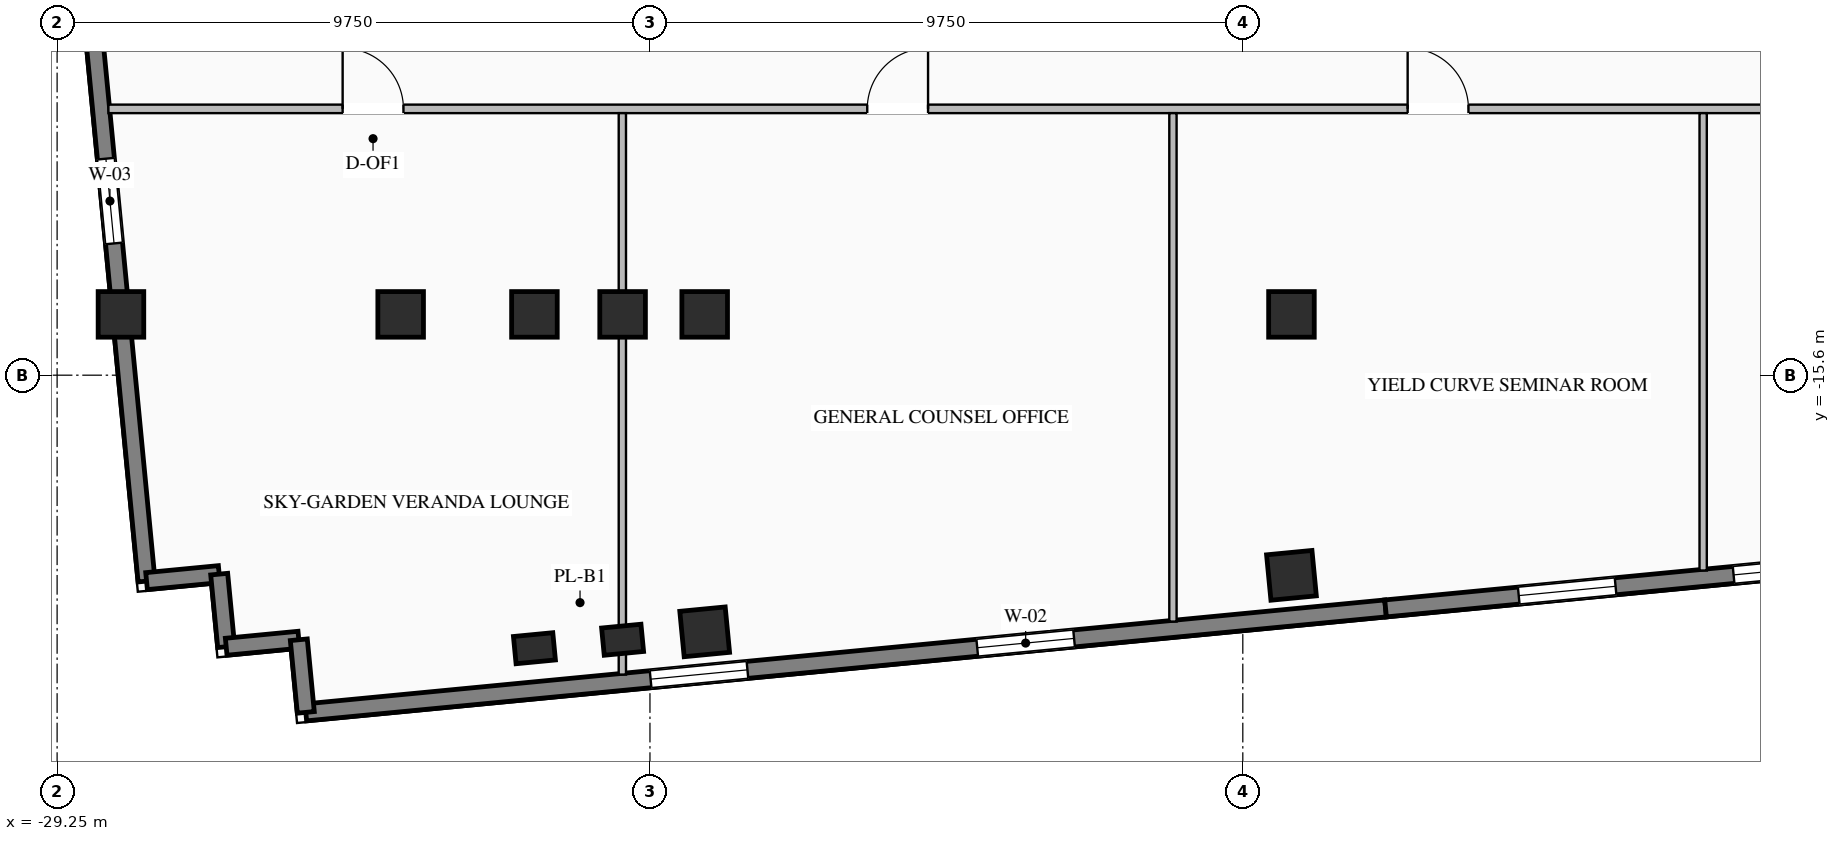
"""IFC4 building model, lengths in metres.
Left out: names, types, materials, properties, quantities, classifications, styles, units other than length and angle.
Written with IfcOpenShell. Run it as: python <this file> out.ifc"""

import sys

from ifc_helpers import new_model, si_unit, direction, frame, frame_2d, origin, origin_2d, place, context, subcontext, project, spatial, rectangle, i_section, extrude, element, fill, save


model = new_model("IFC4")
c1 = context("Model", 3, precision=1e-05, world=origin(), true_north=direction((0.0, 1.0)))
c2 = subcontext(c1, "Body", "Model", "MODEL_VIEW")
j1 = project(units=[si_unit("LENGTHUNIT", "METRE"), si_unit("PLANEANGLEUNIT", "RADIAN")], contexts=[c1])
p1 = place(None, origin())
s1 = spatial("IfcSite", under=j1, at=p1, CompositionType="ELEMENT")
p2 = place(p1, origin())
s2 = spatial("IfcBuilding", under=s1, at=p2, CompositionType="ELEMENT")
p3 = place(p2, frame((0.0, 0.0, 84.55)))
s3 = spatial("IfcBuildingStorey", under=s2, at=p3, CompositionType="ELEMENT", Elevation=84.55)
for number, where, z_axis, x_axis in (
    (1, (-21.4, -14.6, 0.0), (0.0, 0.0, 1.0), (1.0, 0.0, 0.0)),
    (2, (-19.95, -14.6, 0.0), (0.0, 0.0, 1.0), (1.0, 0.0, 0.0)),
    (3, (-18.6, -14.6, 0.0), (0.0, 0.0, 1.0), (1.0, 0.0, 0.0)),
    (4, (-8.95, -14.6, 0.0), (0.0, 0.0, 1.0), (1.0, 0.0, 0.0)),
    (5, (-23.6, -14.6, 0.0), (0.0, 0.0, 1.0), (1.0, 0.0, 0.0)),
    (6, (-28.2, -14.6, 0.0), (0.0, 0.0, 1.0), (1.0, 0.0, 0.0)),
    (7, (-18.6, -19.821, 0.0), (0.0, 0.0, 1.0), (0.995, 0.096, 0.0)),
    (8, (-8.95, -18.892, 0.0), (0.0, 0.0, 1.0), (0.995, 0.096, 0.0)),
):
    element("IfcColumn", number, at=place(p3, frame(where, z_axis=z_axis, x_axis=x_axis)), inside=s3, PredefinedType="COLUMN", context=c2, shape_type="SweptSolid", body=[
        extrude(i_section(OverallWidth=0.75, OverallDepth=0.75, WebThickness=0.03, FlangeThickness=0.044, at=origin_2d()), origin(), (0.0, 0.0, 1.0), 3.45),
    ])
for number, where, z_axis, x_axis in (
    (9, (-21.4, -20.091, 0.0), (0.0, 0.0, 1.0), (0.995, 0.096, 0.0)),
    (10, (-19.95, -19.951, 0.0), (0.0, 0.0, 1.0), (0.995, 0.096, 0.0)),
):
    element("IfcColumn", number, at=place(p3, frame(where, z_axis=z_axis, x_axis=x_axis)), inside=s3, PredefinedType="PILASTER", context=c2, shape_type="SweptSolid", body=[
        extrude(rectangle(XDim=0.65, YDim=0.45, at=origin_2d()), origin(), (0.0, 0.0, 1.0), 3.45),
    ])
p4 = place(p3, frame((-7.402, -19.436, 0.0), z_axis=(0.0, 0.0, 1.0), x_axis=(-0.995395780835, -0.095850088663, 0.0)))
e11 = element("IfcWall", 11, at=p4, inside=s3, PredefinedType="STANDARD", context=c2, shape_type="SweptSolid", body=[
    extrude(rectangle(XDim=17.84, YDim=0.28, at=frame_2d((8.92, 0.0))), origin(), (0.0, 0.0, 1.0), 3.25),
])
p5 = place(p4, frame((5.147, 0.0, 0.76)))
e12 = element("IfcOpeningElement", 12, at=p5, cuts=e11, PredefinedType="OPENING", context=c2, shape_type="SweptSolid", body=[
    extrude(rectangle(XDim=1.6, YDim=1.95, at=frame_2d((0.8, 0.975))), frame((0.0, 0.15, 0.0), z_axis=(0.0, -1.0, 0.0), x_axis=(1.0, 0.0, 0.0)), (0.0, 0.0, 1.0), 0.3),
])
p6 = place(p4, frame((10.543, 0.0, 0.76)))
e13 = element("IfcOpeningElement", 13, at=p6, cuts=e11, PredefinedType="OPENING", context=c2, shape_type="SweptSolid", body=[
    extrude(rectangle(XDim=1.6, YDim=1.95, at=frame_2d((0.8, 0.975))), frame((0.0, 0.15, 0.0), z_axis=(0.0, -1.0, 0.0), x_axis=(1.0, 0.0, 0.0)), (0.0, 0.0, 1.0), 0.3),
])
p7 = place(p3, frame((1.556, -18.573, 0.0), z_axis=(0.0, 0.0, 1.0), x_axis=(-0.995396794462, -0.09583956164, 0.0)))
e14 = element("IfcWall", 14, at=p7, inside=s3, PredefinedType="STANDARD", context=c2, shape_type="SweptSolid", body=[
    extrude(rectangle(XDim=9.0, YDim=0.28, at=frame_2d((4.5, 0.0))), origin(), (0.0, 0.0, 1.0), 3.25),
])
p8 = place(p7, frame((1.65, 0.0, 0.76)))
e15 = element("IfcOpeningElement", 15, at=p8, cuts=e14, PredefinedType="OPENING", context=c2, shape_type="SweptSolid", body=[
    extrude(rectangle(XDim=1.6, YDim=1.95, at=frame_2d((0.8, 0.975))), frame((0.0, 0.15, 0.0), z_axis=(0.0, -1.0, 0.0), x_axis=(1.0, 0.0, 0.0)), (0.0, 0.0, 1.0), 0.3),
])
p9 = place(p7, frame((5.2, 0.0, 0.76)))
e16 = element("IfcOpeningElement", 16, at=p9, cuts=e14, PredefinedType="OPENING", context=c2, shape_type="SweptSolid", body=[
    extrude(rectangle(XDim=1.6, YDim=1.95, at=frame_2d((0.8, 0.975))), frame((0.0, 0.15, 0.0), z_axis=(0.0, -1.0, 0.0), x_axis=(1.0, 0.0, 0.0)), (0.0, 0.0, 1.0), 0.3),
])
p10 = place(p3, frame((-27.779, -18.987, 0.0), z_axis=(0.0, 0.0, 1.0), x_axis=(-0.095842534142, 0.995396508256, 0.0)))
e17 = element("IfcWall", 17, at=p10, inside=s3, PredefinedType="STANDARD", context=c2, shape_type="SweptSolid", body=[
    extrude(rectangle(XDim=18.84, YDim=0.28, at=frame_2d((9.42, 0.0))), origin(), (0.0, 0.0, 1.0), 3.25),
])
p11 = place(p10, frame((5.58, 0.0, 0.76)))
e18 = element("IfcOpeningElement", 18, at=p11, cuts=e17, PredefinedType="OPENING", context=c2, shape_type="SweptSolid", body=[
    extrude(rectangle(XDim=1.4, YDim=1.95, at=frame_2d((0.7, 0.975))), frame((0.0, 0.15, 0.0), z_axis=(0.0, -1.0, 0.0), x_axis=(1.0, 0.0, 0.0)), (0.0, 0.0, 1.0), 0.3),
])
p12 = place(p10, frame((11.86, 0.0, 0.76)))
e19 = element("IfcOpeningElement", 19, at=p12, cuts=e17, PredefinedType="OPENING", context=c2, shape_type="SweptSolid", body=[
    extrude(rectangle(XDim=1.4, YDim=1.95, at=frame_2d((0.7, 0.975))), frame((0.0, 0.15, 0.0), z_axis=(0.0, -1.0, 0.0), x_axis=(1.0, 0.0, 0.0)), (0.0, 0.0, 1.0), 0.3),
])
for number, where, z_axis, x_axis in (
    (20, (-27.779, -18.987, 0.0), (0.0, 0.0, 1.0), (0.995, 0.096, 0.0)),
    (21, (-26.584, -18.872, 0.0), (0.0, 0.0, 1.0), (0.096, -0.995, 0.0)),
    (22, (-26.469, -20.067, 0.0), (0.0, 0.0, 1.0), (0.995, 0.096, 0.0)),
):
    element("IfcWall", number, at=place(p3, frame(where, z_axis=z_axis, x_axis=x_axis)), inside=s3, PredefinedType="STANDARD", context=c2, shape_type="SweptSolid", body=[
        extrude(rectangle(XDim=1.2, YDim=0.28, at=frame_2d((0.6, 0.0))), origin(), (0.0, 0.0, 1.0), 3.25),
    ])
p13 = place(p3, frame((-25.275, -19.952, 0.0), z_axis=(0.0, 0.0, 1.0), x_axis=(0.095836473879, -0.995397091755, 0.0)))
e23 = element("IfcWall", 23, at=p13, inside=s3, PredefinedType="STANDARD", context=c2, shape_type="SweptSolid", body=[
    extrude(rectangle(XDim=1.2, YDim=0.28, at=frame_2d((0.6, 0.0))), origin(), (0.0, 0.0, 1.0), 3.25),
])
p14 = place(p3, frame((-28.406, -11.22, 0.0), z_axis=(0.0, 0.0, 1.0), x_axis=(1.0, 0.0, 0.0)))
e24 = element("IfcWall", 24, at=p14, inside=s3, PredefinedType="STANDARD", context=c2, shape_type="SweptSolid", body=[
    extrude(rectangle(XDim=67.551, YDim=0.14, at=frame_2d((33.775, 0.0))), origin(), (0.0, 0.0, 1.0), 2.745),
])
p15 = place(p14, frame((34.896, 0.0, 0.0)))
e25 = element("IfcOpeningElement", 25, at=p15, cuts=e24, PredefinedType="OPENING", context=c2, shape_type="SweptSolid", body=[
    extrude(rectangle(XDim=0.92, YDim=2.08, at=frame_2d((0.46, 1.04))), frame((0.0, 0.08, 0.0), z_axis=(0.0, -1.0, 0.0), x_axis=(1.0, 0.0, 0.0)), (0.0, 0.0, 1.0), 0.16),
])
p16 = place(p14, frame((38.396, 0.0, 0.0)))
e26 = element("IfcOpeningElement", 26, at=p16, cuts=e24, PredefinedType="OPENING", context=c2, shape_type="SweptSolid", body=[
    extrude(rectangle(XDim=0.92, YDim=2.08, at=frame_2d((0.46, 1.04))), frame((0.0, 0.08, 0.0), z_axis=(0.0, -1.0, 0.0), x_axis=(1.0, 0.0, 0.0)), (0.0, 0.0, 1.0), 0.16),
])
p17 = place(p14, frame((41.246, 0.0, 0.0)))
e27 = element("IfcOpeningElement", 27, at=p17, cuts=e24, PredefinedType="OPENING", context=c2, shape_type="SweptSolid", body=[
    extrude(rectangle(XDim=0.92, YDim=2.08, at=frame_2d((0.46, 1.04))), frame((0.0, 0.08, 0.0), z_axis=(0.0, -1.0, 0.0), x_axis=(1.0, 0.0, 0.0)), (0.0, 0.0, 1.0), 0.16),
])
p18 = place(p14, frame((3.852, 0.0, 0.0)))
e28 = element("IfcOpeningElement", 28, at=p18, cuts=e24, PredefinedType="OPENING", context=c2, shape_type="SweptSolid", body=[
    extrude(rectangle(XDim=1.0, YDim=2.08, at=frame_2d((0.5, 1.04))), frame((0.0, 0.08, 0.0), z_axis=(0.0, -1.0, 0.0), x_axis=(1.0, 0.0, 0.0)), (0.0, 0.0, 1.0), 0.16),
])
p19 = place(p14, frame((12.48, 0.0, 0.0)))
e29 = element("IfcOpeningElement", 29, at=p19, cuts=e24, PredefinedType="OPENING", context=c2, shape_type="SweptSolid", body=[
    extrude(rectangle(XDim=1.0, YDim=2.08, at=frame_2d((0.5, 1.04))), frame((0.0, 0.08, 0.0), z_axis=(0.0, -1.0, 0.0), x_axis=(1.0, 0.0, 0.0)), (0.0, 0.0, 1.0), 0.16),
])
p20 = place(p14, frame((21.367, 0.0, 0.0)))
e30 = element("IfcOpeningElement", 30, at=p20, cuts=e24, PredefinedType="OPENING", context=c2, shape_type="SweptSolid", body=[
    extrude(rectangle(XDim=1.0, YDim=2.08, at=frame_2d((0.5, 1.04))), frame((0.0, 0.08, 0.0), z_axis=(0.0, -1.0, 0.0), x_axis=(1.0, 0.0, 0.0)), (0.0, 0.0, 1.0), 0.16),
])
p21 = place(p14, frame((29.417, 0.0, 0.0)))
e31 = element("IfcOpeningElement", 31, at=p21, cuts=e24, PredefinedType="OPENING", context=c2, shape_type="SweptSolid", body=[
    extrude(rectangle(XDim=1.0, YDim=2.08, at=frame_2d((0.5, 1.04))), frame((0.0, 0.08, 0.0), z_axis=(0.0, -1.0, 0.0), x_axis=(1.0, 0.0, 0.0)), (0.0, 0.0, 1.0), 0.16),
])
p22 = place(p14, frame((45.405, 0.0, 0.0)))
e32 = element("IfcOpeningElement", 32, at=p22, cuts=e24, PredefinedType="OPENING", context=c2, shape_type="SweptSolid", body=[
    extrude(rectangle(XDim=1.0, YDim=2.08, at=frame_2d((0.5, 1.04))), frame((0.0, 0.08, 0.0), z_axis=(0.0, -1.0, 0.0), x_axis=(1.0, 0.0, 0.0)), (0.0, 0.0, 1.0), 0.16),
])
p23 = place(p14, frame((51.852, 0.0, 0.0)))
e33 = element("IfcOpeningElement", 33, at=p23, cuts=e24, PredefinedType="OPENING", context=c2, shape_type="SweptSolid", body=[
    extrude(rectangle(XDim=1.0, YDim=2.08, at=frame_2d((0.5, 1.04))), frame((0.0, 0.08, 0.0), z_axis=(0.0, -1.0, 0.0), x_axis=(1.0, 0.0, 0.0)), (0.0, 0.0, 1.0), 0.16),
])
p24 = place(p14, frame((58.422, 0.0, 0.0)))
e34 = element("IfcOpeningElement", 34, at=p24, cuts=e24, PredefinedType="OPENING", context=c2, shape_type="SweptSolid", body=[
    extrude(rectangle(XDim=1.0, YDim=2.08, at=frame_2d((0.5, 1.04))), frame((0.0, 0.08, 0.0), z_axis=(0.0, -1.0, 0.0), x_axis=(1.0, 0.0, 0.0)), (0.0, 0.0, 1.0), 0.16),
])
p25 = place(p14, frame((64.222, 0.0, 0.0)))
e35 = element("IfcOpeningElement", 35, at=p25, cuts=e24, PredefinedType="OPENING", context=c2, shape_type="SweptSolid", body=[
    extrude(rectangle(XDim=1.0, YDim=2.08, at=frame_2d((0.5, 1.04))), frame((0.0, 0.08, 0.0), z_axis=(0.0, -1.0, 0.0), x_axis=(1.0, 0.0, 0.0)), (0.0, 0.0, 1.0), 0.16),
])
p26 = place(p3, frame((-19.954, -20.524, 0.0), z_axis=(0.0, 0.0, 1.0), x_axis=(0.0, 1.0, 0.0)))
e36 = element("IfcWall", 36, at=p26, inside=s3, PredefinedType="STANDARD", context=c2, shape_type="SweptSolid", body=[
    extrude(rectangle(XDim=9.234, YDim=0.12, at=frame_2d((4.617, 0.0))), origin(), (0.0, 0.0, 1.0), 2.645),
])
p27 = place(p3, frame((-10.899, -19.652, 0.0), z_axis=(0.0, 0.0, 1.0), x_axis=(0.0, 1.0, 0.0)))
e37 = element("IfcWall", 37, at=p27, inside=s3, PredefinedType="STANDARD", context=c2, shape_type="SweptSolid", body=[
    extrude(rectangle(XDim=8.362, YDim=0.12, at=frame_2d((4.181, 0.0))), origin(), (0.0, 0.0, 1.0), 3.25),
])
p28 = place(p3, frame((-2.179, -18.813, 0.0), z_axis=(0.0, 0.0, 1.0), x_axis=(0.0, 1.0, 0.0)))
e38 = element("IfcWall", 38, at=p28, inside=s3, PredefinedType="STANDARD", context=c2, shape_type="SweptSolid", body=[
    extrude(rectangle(XDim=7.523, YDim=0.12, at=frame_2d((3.761, 0.0))), origin(), (0.0, 0.0, 1.0), 3.25),
])
p29 = place(p5, origin())
e39 = element("IfcWindow", 39, at=p29, inside=s3, PartitioningType="SINGLE_PANEL", PredefinedType="WINDOW", context=c2, shape_type="SweptSolid", body=[
    extrude(rectangle(XDim=1.6, YDim=1.95, at=frame_2d((0.8, 0.975))), frame((0.0, 0.03, 0.0), z_axis=(0.0, -1.0, 0.0), x_axis=(1.0, 0.0, 0.0)), (0.0, 0.0, 1.0), 0.06),
])
fill(e12, e39)
p30 = place(p6, origin())
e40 = element("IfcWindow", 40, at=p30, inside=s3, PartitioningType="SINGLE_PANEL", PredefinedType="WINDOW", context=c2, shape_type="SweptSolid", body=[
    extrude(rectangle(XDim=1.6, YDim=1.95, at=frame_2d((0.8, 0.975))), frame((0.0, 0.03, 0.0), z_axis=(0.0, -1.0, 0.0), x_axis=(1.0, 0.0, 0.0)), (0.0, 0.0, 1.0), 0.06),
])
fill(e13, e40)
p31 = place(p8, origin())
e41 = element("IfcWindow", 41, at=p31, inside=s3, PartitioningType="SINGLE_PANEL", PredefinedType="WINDOW", context=c2, shape_type="SweptSolid", body=[
    extrude(rectangle(XDim=1.6, YDim=1.95, at=frame_2d((0.8, 0.975))), frame((0.0, 0.03, 0.0), z_axis=(0.0, -1.0, 0.0), x_axis=(1.0, 0.0, 0.0)), (0.0, 0.0, 1.0), 0.06),
])
fill(e15, e41)
p32 = place(p9, origin())
e42 = element("IfcWindow", 42, at=p32, inside=s3, PartitioningType="SINGLE_PANEL", PredefinedType="WINDOW", context=c2, shape_type="SweptSolid", body=[
    extrude(rectangle(XDim=1.6, YDim=1.95, at=frame_2d((0.8, 0.975))), frame((0.0, 0.03, 0.0), z_axis=(0.0, -1.0, 0.0), x_axis=(1.0, 0.0, 0.0)), (0.0, 0.0, 1.0), 0.06),
])
fill(e16, e42)
p33 = place(p11, origin())
e43 = element("IfcWindow", 43, at=p33, inside=s3, PartitioningType="SINGLE_PANEL", PredefinedType="WINDOW", context=c2, shape_type="SweptSolid", body=[
    extrude(rectangle(XDim=1.4, YDim=1.95, at=frame_2d((0.7, 0.975))), frame((0.0, 0.03, 0.0), z_axis=(0.0, -1.0, 0.0), x_axis=(1.0, 0.0, 0.0)), (0.0, 0.0, 1.0), 0.06),
])
fill(e18, e43)
p34 = place(p18, origin())
e44 = element("IfcDoor", 44, at=p34, inside=s3, OperationType="SINGLE_SWING_LEFT", PredefinedType="DOOR", context=c2, shape_type="SweptSolid", body=[
    extrude(rectangle(XDim=1.0, YDim=2.08, at=frame_2d((0.5, 1.04))), frame((0.0, 0.025, 0.0), z_axis=(0.0, -1.0, 0.0), x_axis=(1.0, 0.0, 0.0)), (0.0, 0.0, 1.0), 0.05),
])
fill(e28, e44)
p35 = place(p19, origin())
e45 = element("IfcDoor", 45, at=p35, inside=s3, OperationType="SINGLE_SWING_RIGHT", PredefinedType="DOOR", context=c2, shape_type="SweptSolid", body=[
    extrude(rectangle(XDim=1.0, YDim=2.08, at=frame_2d((0.5, 1.04))), frame((0.0, 0.025, 0.0), z_axis=(0.0, -1.0, 0.0), x_axis=(1.0, 0.0, 0.0)), (0.0, 0.0, 1.0), 0.05),
])
fill(e29, e45)
p36 = place(p20, origin())
e46 = element("IfcDoor", 46, at=p36, inside=s3, OperationType="SINGLE_SWING_LEFT", PredefinedType="DOOR", context=c2, shape_type="SweptSolid", body=[
    extrude(rectangle(XDim=1.0, YDim=2.08, at=frame_2d((0.5, 1.04))), frame((0.0, 0.025, 0.0), z_axis=(0.0, -1.0, 0.0), x_axis=(1.0, 0.0, 0.0)), (0.0, 0.0, 1.0), 0.05),
])
fill(e30, e46)
save(model, sys.argv[1])
